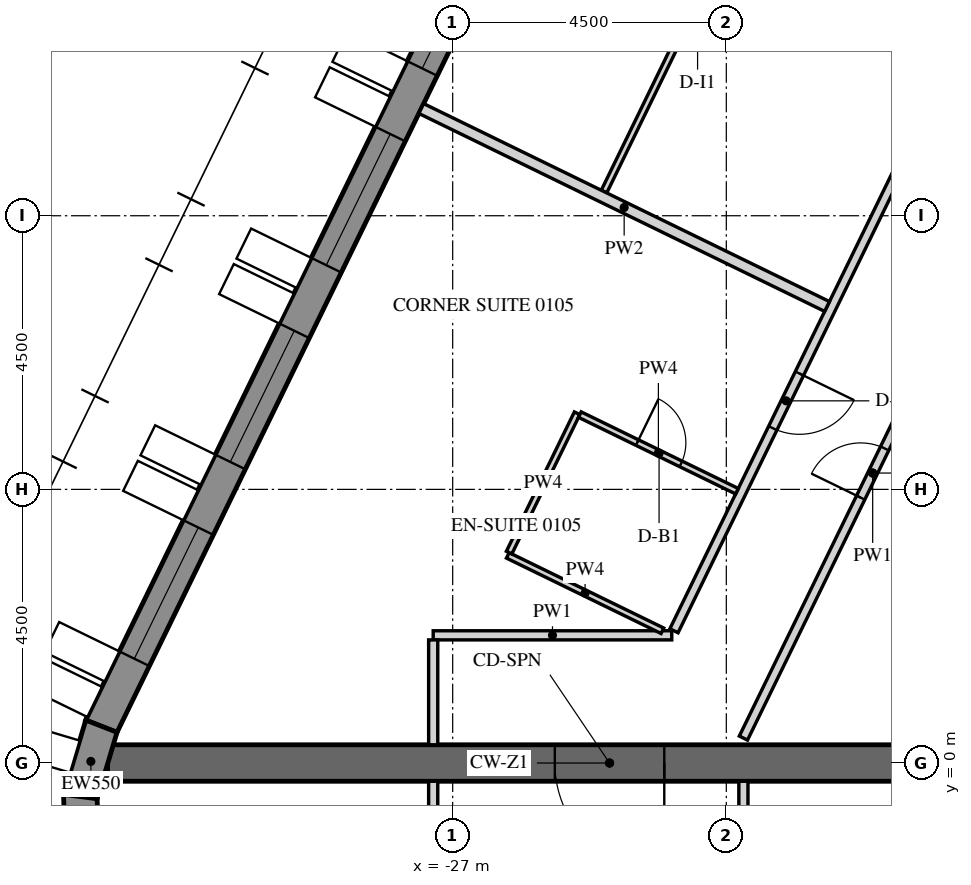
"""IFC4 building model, lengths in metres.
Left out: names, types, materials, properties, quantities, classifications, styles, units other than length and angle.
Written with IfcOpenShell. Run it as: python <this file> out.ifc"""

import sys

from ifc_helpers import new_model, si_unit, direction, frame, frame_2d, origin, place, context, subcontext, project, spatial, polyline, rectangle, outline, extrude, element, fill, save


model = new_model("IFC4")
c1 = context("Model", 3, precision=1e-05, world=origin(), true_north=direction((0.0, 1.0)))
c2 = subcontext(c1, "Body", "Model", "MODEL_VIEW")
j1 = project(units=[si_unit("LENGTHUNIT", "METRE"), si_unit("PLANEANGLEUNIT", "RADIAN")], contexts=[c1])
p1 = place(None, origin())
s1 = spatial("IfcSite", under=j1, at=p1, CompositionType="ELEMENT")
p2 = place(p1, origin())
s2 = spatial("IfcBuilding", under=s1, at=p2, CompositionType="ELEMENT")
p3 = place(p2, frame((0.0, 0.0, 37.5)))
s3 = spatial("IfcBuildingStorey", under=s2, at=p3, CompositionType="ELEMENT", Elevation=37.5)
p4 = place(p3, frame((-19.595, 27.633, -0.15), z_axis=(0.0, 0.0, 1.0), x_axis=(-0.438368285794, -0.898795441694, 0.0)))
e1 = element("IfcWall", 1, at=p4, inside=s3, PredefinedType="SOLIDWALL", context=c2, shape_type="SweptSolid", body=[
    extrude(outline(polyline([(-0.026, -0.275), (30.093, -0.275), (30.048, 0.275), (0.026, 0.275), (-0.026, -0.275)])), origin(), (0.0, 0.0, 1.0), 3.9),
])
p5 = place(p4, frame((1.236, 0.0, 1.05)))
e2 = element("IfcOpeningElement", 2, at=p5, cuts=e1, PredefinedType="OPENING", context=c2, shape_type="SweptSolid", body=[
    extrude(rectangle(XDim=2.4, YDim=2.4, at=frame_2d((1.2, 1.2))), frame((0.0, 0.285, 0.0), z_axis=(0.0, -1.0, 0.0), x_axis=(1.0, 0.0, 0.0)), (0.0, 0.0, 1.0), 0.57),
])
p6 = place(p4, frame((4.835, 0.0, 1.05)))
e3 = element("IfcOpeningElement", 3, at=p6, cuts=e1, PredefinedType="OPENING", context=c2, shape_type="SweptSolid", body=[
    extrude(rectangle(XDim=2.4, YDim=2.4, at=frame_2d((1.2, 1.2))), frame((0.0, 0.285, 0.0), z_axis=(0.0, -1.0, 0.0), x_axis=(1.0, 0.0, 0.0)), (0.0, 0.0, 1.0), 0.57),
])
p7 = place(p4, frame((8.436, 0.0, 1.05)))
e4 = element("IfcOpeningElement", 4, at=p7, cuts=e1, PredefinedType="OPENING", context=c2, shape_type="SweptSolid", body=[
    extrude(rectangle(XDim=2.4, YDim=2.4, at=frame_2d((1.2, 1.2))), frame((0.0, 0.285, 0.0), z_axis=(0.0, -1.0, 0.0), x_axis=(1.0, 0.0, 0.0)), (0.0, 0.0, 1.0), 0.57),
])
p8 = place(p4, frame((12.035, 0.0, 1.05)))
e5 = element("IfcOpeningElement", 5, at=p8, cuts=e1, PredefinedType="OPENING", context=c2, shape_type="SweptSolid", body=[
    extrude(rectangle(XDim=2.4, YDim=2.4, at=frame_2d((1.2, 1.2))), frame((0.0, 0.285, 0.0), z_axis=(0.0, -1.0, 0.0), x_axis=(1.0, 0.0, 0.0)), (0.0, 0.0, 1.0), 0.57),
])
p9 = place(p4, frame((15.635, 0.0, 1.05)))
e6 = element("IfcOpeningElement", 6, at=p9, cuts=e1, PredefinedType="OPENING", context=c2, shape_type="SweptSolid", body=[
    extrude(rectangle(XDim=2.4, YDim=2.4, at=frame_2d((1.2, 1.2))), frame((0.0, 0.285, 0.0), z_axis=(0.0, -1.0, 0.0), x_axis=(1.0, 0.0, 0.0)), (0.0, 0.0, 1.0), 0.57),
])
p10 = place(p4, frame((19.236, 0.0, 1.05)))
e7 = element("IfcOpeningElement", 7, at=p10, cuts=e1, PredefinedType="OPENING", context=c2, shape_type="SweptSolid", body=[
    extrude(rectangle(XDim=2.4, YDim=2.4, at=frame_2d((1.2, 1.2))), frame((0.0, 0.285, 0.0), z_axis=(0.0, -1.0, 0.0), x_axis=(1.0, 0.0, 0.0)), (0.0, 0.0, 1.0), 0.57),
])
p11 = place(p4, frame((22.835, 0.0, 1.05)))
e8 = element("IfcOpeningElement", 8, at=p11, cuts=e1, PredefinedType="OPENING", context=c2, shape_type="SweptSolid", body=[
    extrude(rectangle(XDim=2.4, YDim=2.4, at=frame_2d((1.2, 1.2))), frame((0.0, 0.285, 0.0), z_axis=(0.0, -1.0, 0.0), x_axis=(1.0, 0.0, 0.0)), (0.0, 0.0, 1.0), 0.57),
])
p12 = place(p4, frame((26.436, 0.0, 1.05)))
e9 = element("IfcOpeningElement", 9, at=p12, cuts=e1, PredefinedType="OPENING", context=c2, shape_type="SweptSolid", body=[
    extrude(rectangle(XDim=2.4, YDim=2.4, at=frame_2d((1.2, 1.2))), frame((0.0, 0.285, 0.0), z_axis=(0.0, -1.0, 0.0), x_axis=(1.0, 0.0, 0.0)), (0.0, 0.0, 1.0), 0.57),
])
p13 = place(p3, frame((-32.777, 0.605, -0.15), z_axis=(0.0, 0.0, 1.0), x_axis=(-0.286921497463, -0.957954098219, 0.0)))
e10 = element("IfcWall", 10, at=p13, inside=s3, PredefinedType="SOLIDWALL", context=c2, shape_type="SweptSolid", body=[
    extrude(outline(polyline([(-0.022, -0.275), (1.253, -0.275), (1.163, 0.275), (0.022, 0.275), (-0.022, -0.275)])), origin(), (0.0, 0.0, 1.0), 3.9),
])
p14 = place(p3, frame((-33.124, -0.552, -0.15), z_axis=(0.0, 0.0, 1.0), x_axis=(0.03495638276, -0.999388838893, 0.0)))
e11 = element("IfcWall", 11, at=p14, inside=s3, PredefinedType="SOLIDWALL", context=c2, shape_type="SweptSolid", body=[
    extrude(outline(polyline([(-0.045, -0.275), (1.253, -0.275), (1.163, 0.275), (0.045, 0.275), (-0.045, -0.275)])), origin(), (0.0, 0.0, 1.0), 3.9),
])
p15 = place(p3, frame((-16.166, 0.0, -0.15), z_axis=(0.0, 0.0, 1.0), x_axis=(-1.0, 0.0, 0.0)))
e12 = element("IfcWall", 12, at=p15, inside=s3, PredefinedType="SHEAR", context=c2, shape_type="SweptSolid", body=[
    extrude(rectangle(XDim=16.509, YDim=0.6, at=frame_2d((8.254, 0.0))), origin(), (0.0, 0.0, 1.0), 3.9),
])
p16 = place(p15, frame((7.354, 0.0, 0.15)))
e13 = element("IfcOpeningElement", 13, at=p16, cuts=e12, PredefinedType="OPENING", context=c2, shape_type="SweptSolid", body=[
    extrude(rectangle(XDim=1.8, YDim=2.4, at=frame_2d((0.9, 1.2))), frame((0.0, 0.31, 0.0), z_axis=(0.0, -1.0, 0.0), x_axis=(1.0, 0.0, 0.0)), (0.0, 0.0, 1.0), 0.62),
])
p17 = place(p3, frame((-13.752, 21.875, 0.0), z_axis=(0.0, 0.0, 1.0), x_axis=(-0.438374473378, -0.898792423806, 0.0)))
e14 = element("IfcWall", 14, at=p17, inside=s3, PredefinedType="PARTITIONING", context=c2, shape_type="SweptSolid", body=[
    extrude(rectangle(XDim=21.918, YDim=0.15, at=frame_2d((10.959, 0.0))), origin(), (0.0, 0.0, 1.0), 2.988),
])
p18 = place(p17, frame((9.521, 0.0, 0.0)))
e15 = element("IfcOpeningElement", 15, at=p18, cuts=e14, PredefinedType="OPENING", context=c2, shape_type="SweptSolid", body=[
    extrude(rectangle(XDim=1.0, YDim=2.1, at=frame_2d((0.5, 1.05))), frame((0.0, 0.085, 0.0), z_axis=(0.0, -1.0, 0.0), x_axis=(1.0, 0.0, 0.0)), (0.0, 0.0, 1.0), 0.17),
])
p19 = place(p17, frame((17.211, 0.0, 0.0)))
e16 = element("IfcOpeningElement", 16, at=p19, cuts=e14, PredefinedType="OPENING", context=c2, shape_type="SweptSolid", body=[
    extrude(rectangle(XDim=1.0, YDim=2.1, at=frame_2d((0.5, 1.05))), frame((0.0, 0.085, 0.0), z_axis=(0.0, -1.0, 0.0), x_axis=(1.0, 0.0, 0.0)), (0.0, 0.0, 1.0), 0.17),
])
p20 = place(p3, frame((-23.397, 2.1, 0.0), z_axis=(0.0, 0.0, 1.0), x_axis=(-1.0, 0.0, 0.0)))
e17 = element("IfcWall", 17, at=p20, inside=s3, PredefinedType="PARTITIONING", context=c2, shape_type="SweptSolid", body=[
    extrude(rectangle(XDim=3.923, YDim=0.15, at=frame_2d((1.961, 0.0))), origin(), (0.0, 0.0, 1.0), 2.988),
])
p21 = place(p3, frame((-27.32, 2.025, 0.0), z_axis=(0.0, 0.0, 1.0), x_axis=(0.0, -1.0, 0.0)))
e18 = element("IfcWall", 18, at=p21, inside=s3, PredefinedType="PARTITIONING", context=c2, shape_type="SweptSolid", body=[
    extrude(rectangle(XDim=1.725, YDim=0.15, at=frame_2d((0.862, 0.0))), origin(), (0.0, 0.0, 1.0), 2.988),
])
p22 = place(p3, frame((-22.219, 0.41, 0.0), z_axis=(0.0, 0.0, 1.0), x_axis=(0.438391891827, 0.898783927972, 0.0)))
e19 = element("IfcWall", 19, at=p22, inside=s3, PredefinedType="PARTITIONING", context=c2, shape_type="SweptSolid", body=[
    extrude(rectangle(XDim=9.699, YDim=0.15, at=frame_2d((4.85, 0.0))), origin(), (0.0, 0.0, 1.0), 2.988),
])
p23 = place(p22, frame((4.4, 0.0, 0.0)))
e20 = element("IfcOpeningElement", 20, at=p23, cuts=e19, PredefinedType="OPENING", context=c2, shape_type="SweptSolid", body=[
    extrude(rectangle(XDim=0.9, YDim=2.1, at=frame_2d((0.45, 1.05))), frame((0.0, 0.085, 0.0), z_axis=(0.0, -1.0, 0.0), x_axis=(1.0, 0.0, 0.0)), (0.0, 0.0, 1.0), 0.17),
])
p24 = place(p3, frame((-27.32, -0.3, 0.0), z_axis=(0.0, 0.0, 1.0), x_axis=(0.0, -1.0, 0.0)))
e21 = element("IfcWall", 21, at=p24, inside=s3, PredefinedType="PARTITIONING", context=c2, shape_type="SweptSolid", body=[
    extrude(rectangle(XDim=1.8, YDim=0.15, at=frame_2d((0.9, 0.0))), origin(), (0.0, 0.0, 1.0), 2.988),
])
p25 = place(p3, frame((-22.219, -1.666, 0.0), z_axis=(0.0, 0.0, 1.0), x_axis=(0.0, 1.0, 0.0)))
e22 = element("IfcWall", 22, at=p25, inside=s3, PredefinedType="PARTITIONING", context=c2, shape_type="SweptSolid", body=[
    extrude(rectangle(XDim=1.366, YDim=0.15, at=frame_2d((0.683, 0.0))), origin(), (0.0, 0.0, 1.0), 2.988),
])
p26 = place(p3, frame((-21.416, 15.743, 0.0), z_axis=(0.0, 0.0, 1.0), x_axis=(-0.438380708798, -0.898789382533, 0.0)))
e23 = element("IfcWall", 23, at=p26, inside=s3, PredefinedType="PARTITIONING", context=c2, shape_type="SweptSolid", body=[
    extrude(rectangle(XDim=7.06, YDim=0.1, at=frame_2d((3.53, 0.0))), origin(), (0.0, 0.0, 1.0), 2.988),
])
p27 = place(p26, frame((3.1, 0.0, 0.0)))
e24 = element("IfcOpeningElement", 24, at=p27, cuts=e23, PredefinedType="OPENING", context=c2, shape_type="SweptSolid", body=[
    extrude(rectangle(XDim=0.9, YDim=2.1, at=frame_2d((0.45, 1.05))), frame((0.0, 0.06, 0.0), z_axis=(0.0, -1.0, 0.0), x_axis=(1.0, 0.0, 0.0)), (0.0, 0.0, 1.0), 0.12),
])
p28 = place(p3, frame((-27.517, 10.763, 0.0), z_axis=(0.0, 0.0, 1.0), x_axis=(0.898789933843, -0.438379578473, 0.0)))
e25 = element("IfcWall", 25, at=p28, inside=s3, PredefinedType="PARTITIONING", context=c2, shape_type="SweptSolid", body=[
    extrude(rectangle(XDim=7.425, YDim=0.18, at=frame_2d((3.712, 0.0))), origin(), (0.0, 0.0, 1.0), 2.988),
])
p29 = place(p3, frame((-23.551, 2.175, 0.0), z_axis=(0.0, 0.0, 1.0), x_axis=(-0.89881903386, 0.438319910991, 0.0)))
e26 = element("IfcWall", 26, at=p29, inside=s3, PredefinedType="PARTITIONING", context=c2, shape_type="SweptSolid", body=[
    extrude(rectangle(XDim=2.829, YDim=0.1, at=frame_2d((1.415, 0.0))), origin(), (0.0, 0.0, 1.0), 2.988),
])
p30 = place(p3, frame((-26.072, 3.46, 0.0), z_axis=(0.0, 0.0, 1.0), x_axis=(0.438306676818, 0.898825487543, 0.0)))
e27 = element("IfcWall", 27, at=p30, inside=s3, PredefinedType="PARTITIONING", context=c2, shape_type="SweptSolid", body=[
    extrude(rectangle(XDim=2.55, YDim=0.1, at=frame_2d((1.275, 0.0))), origin(), (0.0, 0.0, 1.0), 2.988),
])
p31 = place(p3, frame((-24.909, 5.73, 0.0), z_axis=(0.0, 0.0, 1.0), x_axis=(0.898799457159, -0.438360052708, 0.0)))
e28 = element("IfcWall", 28, at=p31, inside=s3, PredefinedType="PARTITIONING", context=c2, shape_type="SweptSolid", body=[
    extrude(rectangle(XDim=2.875, YDim=0.1, at=frame_2d((1.438, 0.0))), origin(), (0.0, 0.0, 1.0), 2.988),
])
p32 = place(p31, frame((1.05, 0.0, 0.0)))
e29 = element("IfcOpeningElement", 29, at=p32, cuts=e28, PredefinedType="OPENING", context=c2, shape_type="SweptSolid", body=[
    extrude(rectangle(XDim=0.8, YDim=2.1, at=frame_2d((0.4, 1.05))), frame((0.0, 0.06, 0.0), z_axis=(0.0, -1.0, 0.0), x_axis=(1.0, 0.0, 0.0)), (0.0, 0.0, 1.0), 0.12),
])
p33 = place(p9, frame((0.0, 0.205, 0.0)))
e30 = element("IfcWindow", 30, at=p33, inside=s3, PartitioningType="DOUBLE_PANEL_VERTICAL", PredefinedType="WINDOW", context=c2, shape_type="SweptSolid", body=[
    extrude(rectangle(XDim=2.4, YDim=2.4, at=frame_2d((1.2, 1.2))), frame((0.0, 0.03, 0.0), z_axis=(0.0, -1.0, 0.0), x_axis=(1.0, 0.0, 0.0)), (0.0, 0.0, 1.0), 0.06),
])
fill(e6, e30)
p34 = place(p10, frame((0.0, 0.205, 0.0)))
e31 = element("IfcWindow", 31, at=p34, inside=s3, PartitioningType="DOUBLE_PANEL_VERTICAL", PredefinedType="WINDOW", context=c2, shape_type="SweptSolid", body=[
    extrude(rectangle(XDim=2.4, YDim=2.4, at=frame_2d((1.2, 1.2))), frame((0.0, 0.03, 0.0), z_axis=(0.0, -1.0, 0.0), x_axis=(1.0, 0.0, 0.0)), (0.0, 0.0, 1.0), 0.06),
])
fill(e7, e31)
p35 = place(p11, frame((0.0, 0.205, 0.0)))
e32 = element("IfcWindow", 32, at=p35, inside=s3, PartitioningType="DOUBLE_PANEL_VERTICAL", PredefinedType="WINDOW", context=c2, shape_type="SweptSolid", body=[
    extrude(rectangle(XDim=2.4, YDim=2.4, at=frame_2d((1.2, 1.2))), frame((0.0, 0.03, 0.0), z_axis=(0.0, -1.0, 0.0), x_axis=(1.0, 0.0, 0.0)), (0.0, 0.0, 1.0), 0.06),
])
fill(e8, e32)
p36 = place(p12, frame((0.0, 0.205, 0.0)))
e33 = element("IfcWindow", 33, at=p36, inside=s3, PartitioningType="DOUBLE_PANEL_VERTICAL", PredefinedType="WINDOW", context=c2, shape_type="SweptSolid", body=[
    extrude(rectangle(XDim=2.4, YDim=2.4, at=frame_2d((1.2, 1.2))), frame((0.0, 0.03, 0.0), z_axis=(0.0, -1.0, 0.0), x_axis=(1.0, 0.0, 0.0)), (0.0, 0.0, 1.0), 0.06),
])
fill(e9, e33)
p37 = place(p16, origin())
e34 = element("IfcDoor", 34, at=p37, inside=s3, OperationType="DOUBLE_DOOR_SINGLE_SWING", PredefinedType="DOOR", context=c2, shape_type="SweptSolid", body=[
    extrude(rectangle(XDim=1.8, YDim=2.4, at=frame_2d((0.9, 1.2))), frame((0.0, 0.025, 0.0), z_axis=(0.0, -1.0, 0.0), x_axis=(1.0, 0.0, 0.0)), (0.0, 0.0, 1.0), 0.05),
])
fill(e13, e34)
p38 = place(p19, origin())
e35 = element("IfcDoor", 35, at=p38, inside=s3, OperationType="SINGLE_SWING_LEFT", PredefinedType="DOOR", context=c2, shape_type="SweptSolid", body=[
    extrude(rectangle(XDim=1.0, YDim=2.1, at=frame_2d((0.5, 1.05))), frame((0.0, 0.025, 0.0), z_axis=(0.0, -1.0, 0.0), x_axis=(1.0, 0.0, 0.0)), (0.0, 0.0, 1.0), 0.05),
])
fill(e16, e35)
p39 = place(p32, origin())
e36 = element("IfcDoor", 36, at=p39, inside=s3, OperationType="SINGLE_SWING_RIGHT", PredefinedType="DOOR", context=c2, shape_type="SweptSolid", body=[
    extrude(rectangle(XDim=0.8, YDim=2.1, at=frame_2d((0.4, 1.05))), frame((0.0, 0.025, 0.0), z_axis=(0.0, -1.0, 0.0), x_axis=(1.0, 0.0, 0.0)), (0.0, 0.0, 1.0), 0.05),
])
fill(e29, e36)
p40 = place(p23, origin())
e37 = element("IfcDoor", 37, at=p40, inside=s3, OperationType="SINGLE_SWING_LEFT", PredefinedType="DOOR", context=c2, shape_type="SweptSolid", body=[
    extrude(rectangle(XDim=0.9, YDim=2.1, at=frame_2d((0.45, 1.05))), frame((0.0, 0.025, 0.0), z_axis=(0.0, -1.0, 0.0), x_axis=(1.0, 0.0, 0.0)), (0.0, 0.0, 1.0), 0.05),
])
fill(e20, e37)
save(model, sys.argv[1])
